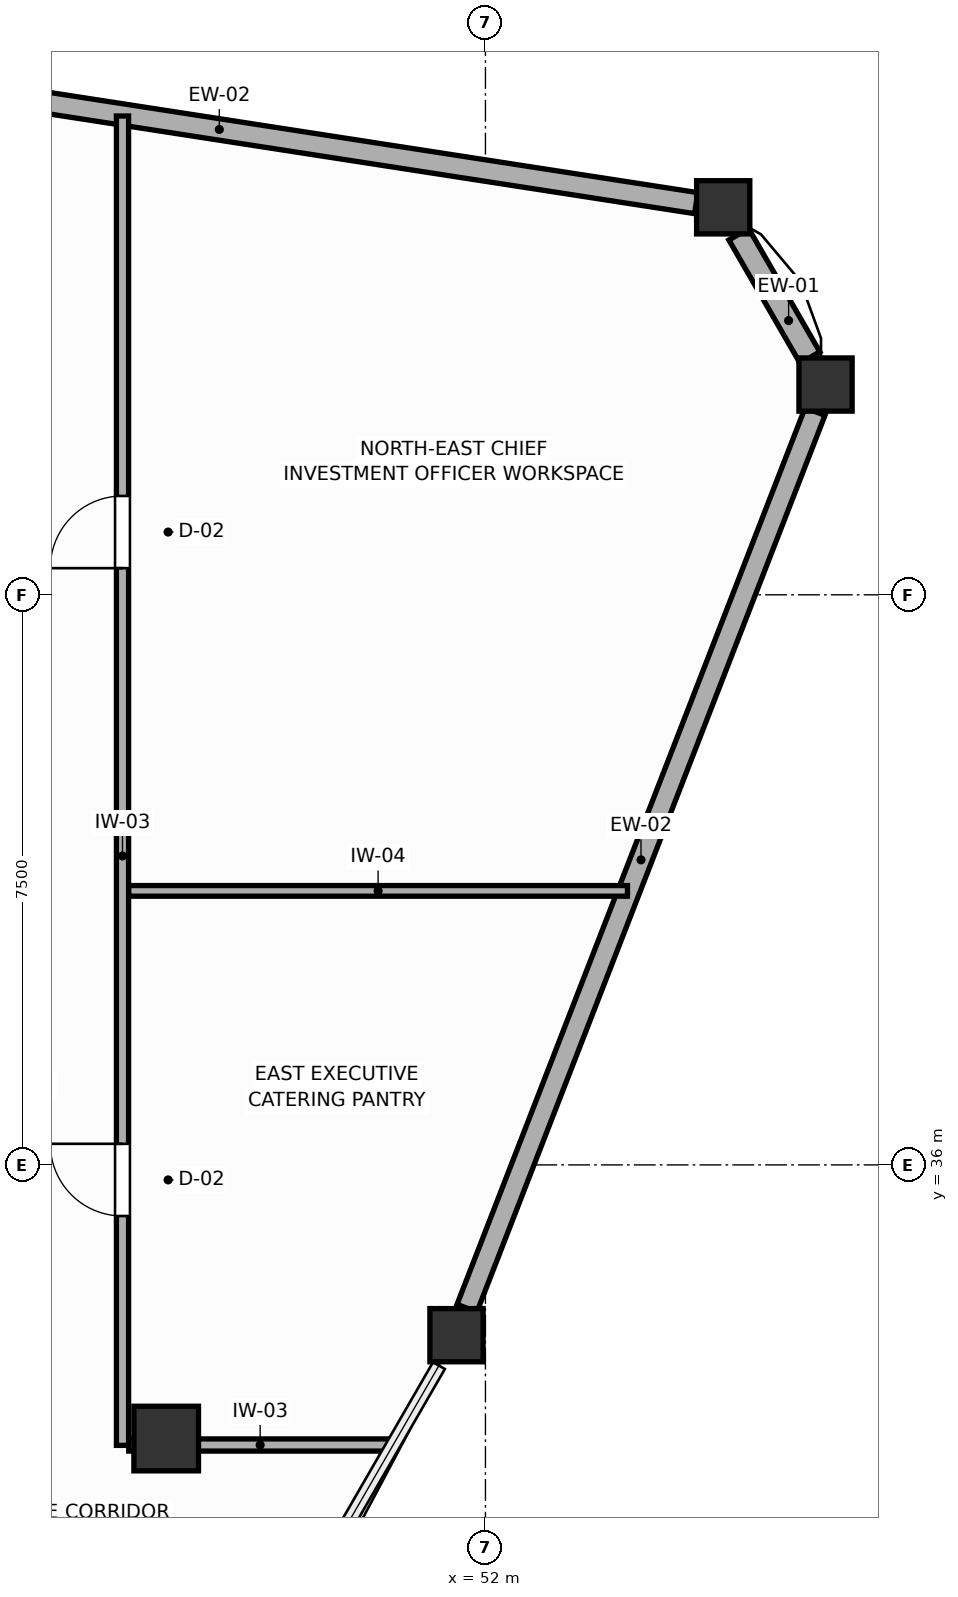
"""IFC4 building model, lengths in metres.
Left out: names, types, materials, properties, quantities, classifications, styles, units other than length and angle.
Written with IfcOpenShell. Run it as: python <this file> out.ifc"""

import sys

from ifc_helpers import new_model, si_unit, direction, frame, frame_2d, origin, origin_2d, place, context, subcontext, project, spatial, rectangle, extrude, source, transform, mapped, element, fill, save


model = new_model("IFC4")
c1 = context("Model", 3, precision=1e-05, world=origin(), true_north=direction((0.0, 1.0)))
c2 = subcontext(c1, "Body", "Model", "MODEL_VIEW")
j1 = project(units=[si_unit("LENGTHUNIT", "METRE"), si_unit("PLANEANGLEUNIT", "RADIAN")], contexts=[c1])
p1 = place(None, origin())
s1 = spatial("IfcSite", under=j1, at=p1, CompositionType="ELEMENT")
p2 = place(p1, origin())
s2 = spatial("IfcBuilding", under=s1, at=p2, CompositionType="ELEMENT")
p3 = place(p2, frame((0.0, 0.0, 271.8)))
s3 = spatial("IfcBuildingStorey", under=s2, at=p3, CompositionType="ELEMENT", Elevation=271.8)
m1 = source(origin(), c2, "Body", "SweptSolid", [
    extrude(rectangle(XDim=0.85, YDim=0.85, at=origin_2d()), origin(), (0.0, 0.0, 1.0), 3.6),
])
p4 = place(p3, frame((47.8, 32.4, 0.0), z_axis=(0.0, 0.0, 1.0), x_axis=(1.0, 0.0, 0.0)))
e1 = element("IfcColumn", 1, at=p4, inside=s3, PredefinedType="COLUMN", context=c2, shape_type="MappedRepresentation", body=[
    mapped(m1, transform((0.0, 0.0, 0.0), scale=1.0)),
])
m2 = source(origin(), c2, "Body", "SweptSolid", [
    extrude(rectangle(XDim=0.7, YDim=0.7, at=origin_2d()), origin(), (0.0, 0.0, 1.0), 3.6),
])
for number, where, z_axis, x_axis in (
    (2, (56.474, 46.266, 0.0), (0.0, 0.0, 1.0), (1.0, 0.0, 0.0)),
    (3, (55.128, 48.598, 0.0), (0.0, 0.0, 1.0), (1.0, 0.0, 0.0)),
    (4, (51.619, 33.76, 0.0), (0.0, 0.0, 1.0), (1.0, 0.0, 0.0)),
):
    element("IfcColumn", number, at=place(p3, frame(where, z_axis=z_axis, x_axis=x_axis)), inside=s3, PredefinedType="COLUMN", context=c2, shape_type="MappedRepresentation", body=[
        mapped(m2, transform((0.0, 0.0, 0.0), scale=1.0)),
    ])
p5 = place(p3, frame((56.269, 46.621, 0.0), z_axis=(0.0, 0.0, 1.0), x_axis=(-0.500023421257, 0.866011881093, 0.0)))
e5 = element("IfcWall", 5, at=p5, inside=s3, PredefinedType="SOLIDWALL", context=c2, shape_type="SweptSolid", body=[
    extrude(rectangle(XDim=1.873, YDim=0.3, at=frame_2d((0.936, 0.0))), origin(), (0.0, 0.0, 1.0), 2.04),
])
p6 = place(p3, frame((54.773, 48.653, 0.0), z_axis=(0.0, 0.0, 1.0), x_axis=(-0.988271454673, 0.152707340617, 0.0)))
e6 = element("IfcWall", 6, at=p6, inside=s3, PredefinedType="SOLIDWALL", context=c2, shape_type="SweptSolid", body=[
    extrude(rectangle(XDim=12.697, YDim=0.28, at=frame_2d((6.349, 0.0))), origin(), (0.0, 0.0, 1.0), 2.04),
])
p7 = place(p3, frame((51.757, 34.115, 0.0), z_axis=(0.0, 0.0, 1.0), x_axis=(0.3618810561, 0.932224276253, 0.0)))
e7 = element("IfcWall", 7, at=p7, inside=s3, PredefinedType="SOLIDWALL", context=c2, shape_type="SweptSolid", body=[
    extrude(rectangle(XDim=12.654, YDim=0.28, at=frame_2d((6.327, 0.0))), origin(), (0.0, 0.0, 1.0), 2.04),
])
p8 = place(p3, frame((47.225, 32.31, 0.0), z_axis=(0.0, 0.0, 1.0), x_axis=(0.0, 1.0, 0.0)))
e8 = element("IfcWall", 8, at=p8, inside=s3, PredefinedType="PARTITIONING", context=c2, shape_type="SweptSolid", body=[
    extrude(rectangle(XDim=17.489, YDim=0.16, at=frame_2d((8.745, 0.0))), origin(), (0.0, 0.0, 1.0), 3.18),
])
p9 = place(p8, frame((3.018, 0.0, 0.0)))
e9 = element("IfcOpeningElement", 9, at=p9, cuts=e8, PredefinedType="OPENING", context=c2, shape_type="SweptSolid", body=[
    extrude(rectangle(XDim=0.95, YDim=2.05, at=frame_2d((0.475, 1.025))), frame((0.0, 0.09, 0.0), z_axis=(0.0, -1.0, 0.0), x_axis=(1.0, 0.0, 0.0)), (0.0, 0.0, 1.0), 0.18),
])
p10 = place(p8, frame((11.541, 0.0, 0.0)))
e10 = element("IfcOpeningElement", 10, at=p10, cuts=e8, PredefinedType="OPENING", context=c2, shape_type="SweptSolid", body=[
    extrude(rectangle(XDim=0.95, YDim=2.05, at=frame_2d((0.475, 1.025))), frame((0.0, 0.09, 0.0), z_axis=(0.0, -1.0, 0.0), x_axis=(1.0, 0.0, 0.0)), (0.0, 0.0, 1.0), 0.18),
])
p11 = place(p3, frame((47.307, 32.315, 0.0), z_axis=(0.0, 0.0, 1.0), x_axis=(1.0, 0.0, 0.0)))
e11 = element("IfcWall", 11, at=p11, inside=s3, PredefinedType="PARTITIONING", context=c2, shape_type="SweptSolid", body=[
    extrude(rectangle(XDim=3.458, YDim=0.16, at=frame_2d((1.729, 0.0))), origin(), (0.0, 0.0, 1.0), 2.04),
])
p12 = place(p3, frame((47.307, 39.605, 0.0), z_axis=(0.0, 0.0, 1.0), x_axis=(1.0, 0.0, 0.0)))
e12 = element("IfcWall", 12, at=p12, inside=s3, PredefinedType="PARTITIONING", context=c2, shape_type="SweptSolid", body=[
    extrude(rectangle(XDim=6.562, YDim=0.14, at=frame_2d((3.281, 0.0))), origin(), (0.0, 0.0, 1.0), 3.18),
])
p13 = place(p9, origin())
e13 = element("IfcDoor", 13, at=p13, inside=s3, OperationType="SINGLE_SWING_RIGHT", PredefinedType="DOOR", context=c2, shape_type="SweptSolid", body=[
    extrude(rectangle(XDim=0.95, YDim=2.05, at=frame_2d((0.475, 1.025))), frame((0.0, 0.025, 0.0), z_axis=(0.0, -1.0, 0.0), x_axis=(1.0, 0.0, 0.0)), (0.0, 0.0, 1.0), 0.05),
])
fill(e9, e13)
p14 = place(p10, origin())
e14 = element("IfcDoor", 14, at=p14, inside=s3, OperationType="SINGLE_SWING_LEFT", PredefinedType="DOOR", context=c2, shape_type="SweptSolid", body=[
    extrude(rectangle(XDim=0.95, YDim=2.05, at=frame_2d((0.475, 1.025))), frame((0.0, 0.025, 0.0), z_axis=(0.0, -1.0, 0.0), x_axis=(1.0, 0.0, 0.0)), (0.0, 0.0, 1.0), 0.05),
])
fill(e10, e14)
save(model, sys.argv[1])
